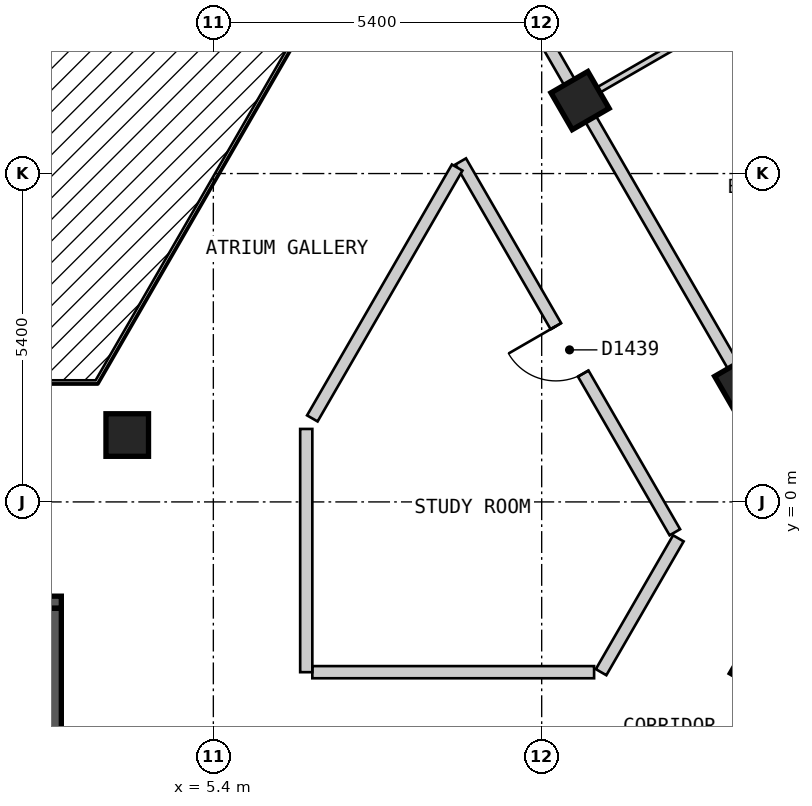
"""IFC4 building model, lengths in metres.
Left out: names, types, materials, properties, quantities, classifications, styles, units other than length and angle.
Written with IfcOpenShell. Run it as: python <this file> out.ifc"""

import sys

from ifc_helpers import new_model, si_unit, direction, frame, frame_2d, origin, origin_2d, place, context, subcontext, project, spatial, rectangle, extrude, element, fill, save


model = new_model("IFC4")
c1 = context("Model", 3, precision=1e-05, world=origin(), true_north=direction((0.0, 1.0)))
c2 = subcontext(c1, "Body", "Model", "MODEL_VIEW")
j1 = project(units=[si_unit("LENGTHUNIT", "METRE"), si_unit("PLANEANGLEUNIT", "RADIAN")], contexts=[c1])
p1 = place(None, origin())
s1 = spatial("IfcSite", under=j1, at=p1, CompositionType="ELEMENT")
p2 = place(p1, origin())
s2 = spatial("IfcBuilding", under=s1, at=p2, CompositionType="ELEMENT")
p3 = place(p2, frame((0.0, 0.0, 178.2)))
s3 = spatial("IfcBuildingStorey", under=s2, at=p3, CompositionType="ELEMENT", Elevation=178.2)
for number, where, z_axis, x_axis in (
    (1, (14.382, -2.689, 0.0), (0.0, 0.0, 1.0), (0.5, 0.866, 0.0)),
    (2, (14.123, 1.937, 0.0), (0.0, 0.0, 1.0), (-0.5, 0.866, 0.0)),
    (3, (3.984, 1.1, 0.0), (0.0, 0.0, 1.0), (1.0, 0.0, 0.0)),
    (4, (11.431, 6.6, 0.0), (0.0, 0.0, 1.0), (-0.5, 0.866, 0.0)),
):
    element("IfcColumn", number, at=place(p3, frame(where, z_axis=z_axis, x_axis=x_axis)), inside=s3, PredefinedType="COLUMN", context=c2, shape_type="SweptSolid", body=[
        extrude(rectangle(XDim=0.7, YDim=0.7, at=origin_2d()), origin(), (0.0, 0.0, 1.0), 3.0),
    ])
p4 = place(p3, frame((-2.9, -1.65, 0.0), z_axis=(0.0, 0.0, 1.0), x_axis=(1.0, 0.0, 0.0)))
e5 = element("IfcWall", 5, at=p4, inside=s3, PredefinedType="SOLIDWALL", context=c2, shape_type="SweptSolid", body=[
    extrude(rectangle(XDim=5.8, YDim=0.2, at=frame_2d((2.9, 0.0))), origin(), (0.0, 0.0, 1.0), 2.7),
])
p5 = place(p4, frame((0.3, 0.0, 0.0)))
e6 = element("IfcOpeningElement", 6, at=p5, cuts=e5, PredefinedType="OPENING", context=c2, shape_type="SweptSolid", body=[
    extrude(rectangle(XDim=1.2, YDim=2.1, at=frame_2d((0.6, 1.05))), frame((0.0, 0.11, 0.0), z_axis=(0.0, -1.0, 0.0), x_axis=(1.0, 0.0, 0.0)), (0.0, 0.0, 1.0), 0.22),
])
p6 = place(p3, frame((2.8, -4.5, 0.0), z_axis=(0.0, 0.0, 1.0), x_axis=(0.0, 1.0, 0.0)))
e7 = element("IfcWall", 7, at=p6, inside=s3, PredefinedType="SOLIDWALL", context=c2, shape_type="SweptSolid", body=[
    extrude(rectangle(XDim=2.75, YDim=0.2, at=frame_2d((1.375, 0.0))), origin(), (0.0, 0.0, 1.0), 2.7),
])
p7 = place(p3, frame((9.469, 5.6, 0.0), z_axis=(0.0, 0.0, 1.0), x_axis=(0.499964524401, -0.866045884662, 0.0)))
e8 = element("IfcWall", 8, at=p7, inside=s3, PredefinedType="PARTITIONING", context=c2, shape_type="SweptSolid", body=[
    extrude(rectangle(XDim=7.042, YDim=0.2, at=frame_2d((3.521, 0.0))), origin(), (0.0, 0.0, 1.0), 2.7),
])
p8 = place(p7, frame((3.129, 0.0, 0.0)))
e9 = element("IfcOpeningElement", 9, at=p8, cuts=e8, PredefinedType="OPENING", context=c2, shape_type="SweptSolid", body=[
    extrude(rectangle(XDim=0.9, YDim=2.1, at=frame_2d((0.45, 1.05))), frame((0.0, 0.11, 0.0), z_axis=(0.0, -1.0, 0.0), x_axis=(1.0, 0.0, 0.0)), (0.0, 0.0, 1.0), 0.22),
])
p9 = place(p3, frame((10.739, 7.8, 0.0), z_axis=(0.0, 0.0, 1.0), x_axis=(0.499964311759, -0.86604600742, 0.0)))
e10 = element("IfcWall", 10, at=p9, inside=s3, PredefinedType="PARTITIONING", context=c2, shape_type="SweptSolid", body=[
    extrude(rectangle(XDim=9.583, YDim=0.2, at=frame_2d((4.792, 0.0))), origin(), (0.0, 0.0, 1.0), 2.7),
])
p10 = place(p3, frame((7.028, -2.8, 0.0), z_axis=(0.0, 0.0, 1.0), x_axis=(1.0, 0.0, 0.0)))
e11 = element("IfcWall", 11, at=p10, inside=s3, PredefinedType="PARTITIONING", context=c2, shape_type="SweptSolid", body=[
    extrude(rectangle(XDim=4.634, YDim=0.2, at=frame_2d((2.317, 0.0))), origin(), (0.0, 0.0, 1.0), 2.7),
])
p11 = place(p3, frame((7.028, 1.373, 0.0), z_axis=(0.0, 0.0, 1.0), x_axis=(0.499953126767, 0.866052464367, 0.0)))
e12 = element("IfcWall", 12, at=p11, inside=s3, PredefinedType="PARTITIONING", context=c2, shape_type="SweptSolid", body=[
    extrude(rectangle(XDim=4.764, YDim=0.2, at=frame_2d((2.382, 0.0))), origin(), (0.0, 0.0, 1.0), 2.7),
])
p12 = place(p3, frame((11.777, -2.8, 0.0), z_axis=(0.0, 0.0, 1.0), x_axis=(0.500085537782, 0.86597601289, 0.0)))
e13 = element("IfcWall", 13, at=p12, inside=s3, PredefinedType="PARTITIONING", context=c2, shape_type="SweptSolid", body=[
    extrude(rectangle(XDim=2.542, YDim=0.2, at=frame_2d((1.271, 0.0))), origin(), (0.0, 0.0, 1.0), 2.7),
])
p13 = place(p3, frame((6.928, -2.8, 0.0), z_axis=(0.0, 0.0, 1.0), x_axis=(0.0, 1.0, 0.0)))
e14 = element("IfcWall", 14, at=p13, inside=s3, PredefinedType="PARTITIONING", context=c2, shape_type="SweptSolid", body=[
    extrude(rectangle(XDim=4.0, YDim=0.2, at=frame_2d((2.0, 0.0))), origin(), (0.0, 0.0, 1.0), 2.7),
])
p14 = place(p3, frame((11.518, 6.65, 0.0), z_axis=(0.0, 0.0, 1.0), x_axis=(0.865949381454, 0.500131651427, 0.0)))
e15 = element("IfcWall", 15, at=p14, inside=s3, PredefinedType="PARTITIONING", context=c2, shape_type="SweptSolid", body=[
    extrude(rectangle(XDim=4.097, YDim=0.1, at=frame_2d((2.049, 0.0))), origin(), (0.0, 0.0, 1.0), 2.7),
])
p15 = place(p14, frame((1.623, 0.0, 0.0)))
e16 = element("IfcOpeningElement", 16, at=p15, cuts=e15, PredefinedType="OPENING", context=c2, shape_type="SweptSolid", body=[
    extrude(rectangle(XDim=0.8, YDim=2.1, at=frame_2d((0.4, 1.05))), frame((0.0, 0.06, 0.0), z_axis=(0.0, -1.0, 0.0), x_axis=(1.0, 0.0, 0.0)), (0.0, 0.0, 1.0), 0.12),
])
p16 = place(p8, origin())
e17 = element("IfcDoor", 17, at=p16, inside=s3, OperationType="SINGLE_SWING_LEFT", PredefinedType="DOOR", context=c2, shape_type="SweptSolid", body=[
    extrude(rectangle(XDim=0.9, YDim=2.1, at=frame_2d((0.45, 1.05))), frame((0.0, 0.025, 0.0), z_axis=(0.0, -1.0, 0.0), x_axis=(1.0, 0.0, 0.0)), (0.0, 0.0, 1.0), 0.05),
])
fill(e9, e17)
save(model, sys.argv[1])
